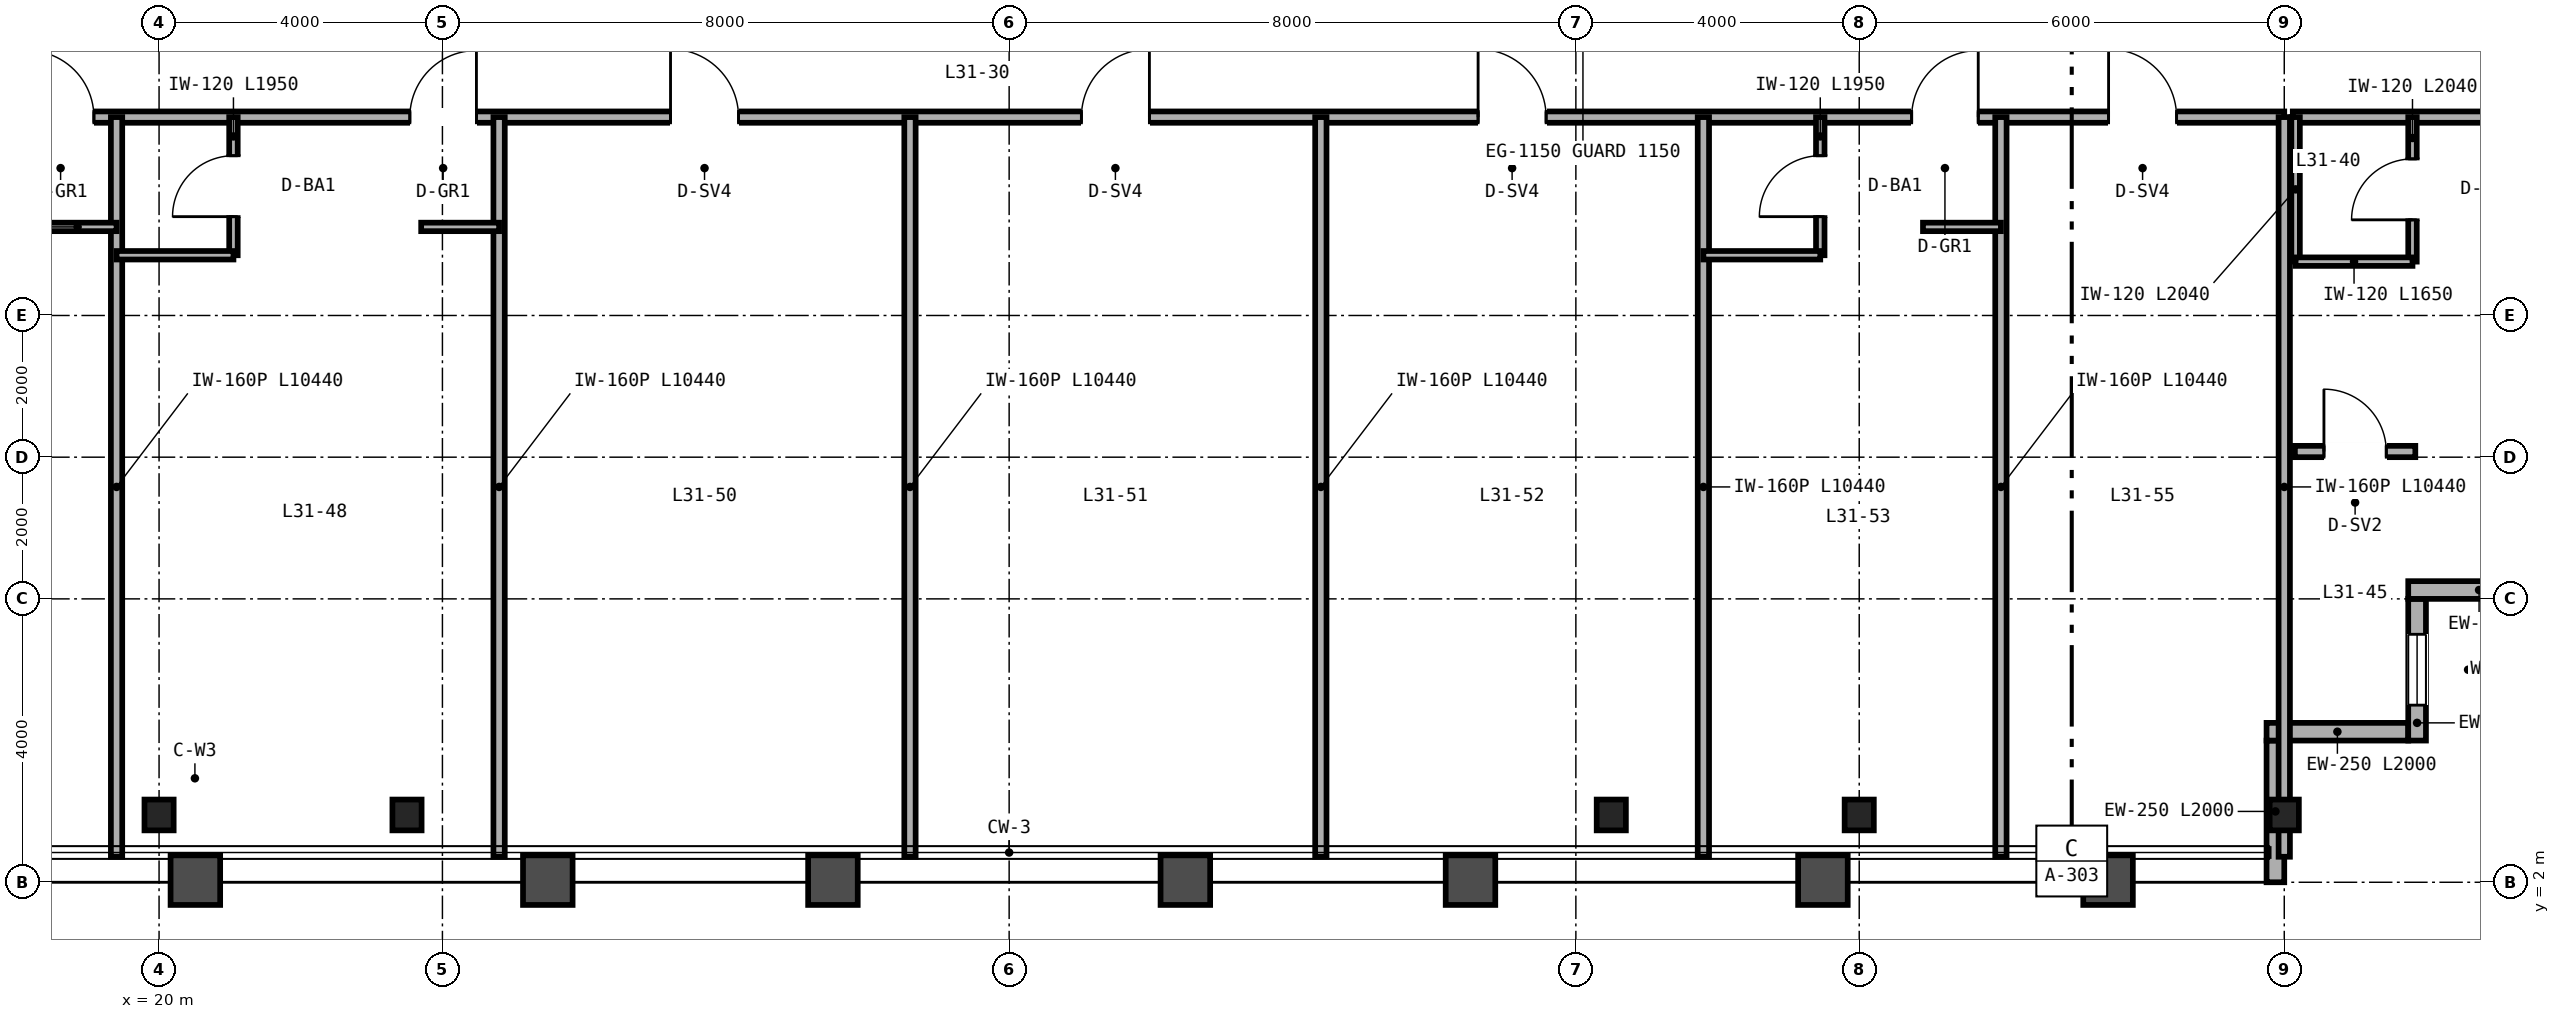
"""IFC4 building model, lengths in metres.
Left out: names, types, materials, properties, quantities, classifications, styles, units other than length and angle.
Written with IfcOpenShell. Run it as: python <this file> out.ifc"""

import sys

from ifc_helpers import new_model, si_unit, direction, frame, frame_2d, origin, origin_2d, place, context, subcontext, project, spatial, rectangle, i_section, extrude, source, transform, mapped, element, fill, save


model = new_model("IFC4")
c1 = context("Model", 3, precision=1e-05, world=origin(), true_north=direction((0.0, 1.0)))
c2 = subcontext(c1, "Body", "Model", "MODEL_VIEW")
j1 = project(units=[si_unit("LENGTHUNIT", "METRE"), si_unit("PLANEANGLEUNIT", "RADIAN")], contexts=[c1])
p1 = place(None, origin())
s1 = spatial("IfcSite", under=j1, at=p1, CompositionType="ELEMENT")
p2 = place(p1, origin())
s2 = spatial("IfcBuilding", under=s1, at=p2, CompositionType="ELEMENT")
p3 = place(p2, frame((0.0, 0.0, 126.0)))
s3 = spatial("IfcBuildingStorey", under=s2, at=p3, CompositionType="ELEMENT", Elevation=126.0)
m1 = source(origin(), c2, "Body", "SweptSolid", [
    extrude(i_section(OverallWidth=0.412, OverallDepth=0.435, WebThickness=0.036, FlangeThickness=0.057, FilletRadius=0.025, at=origin_2d()), origin(), (0.0, 0.0, 1.0), 3.36),
])
for number, where, z_axis, x_axis in (
    (1, (20.0, 2.95, 0.0), (0.0, 0.0, 1.0), (1.0, 0.0, 0.0)),
    (2, (23.5, 2.95, 0.0), (0.0, 0.0, 1.0), (1.0, 0.0, 0.0)),
    (3, (40.5, 2.95, 0.0), (0.0, 0.0, 1.0), (1.0, 0.0, 0.0)),
    (4, (44.0, 2.95, 0.0), (0.0, 0.0, 1.0), (1.0, 0.0, 0.0)),
    (5, (50.0, 2.95, 0.0), (0.0, 0.0, 1.0), (1.0, 0.0, 0.0)),
):
    element("IfcColumn", number, at=place(p3, frame(where, z_axis=z_axis, x_axis=x_axis)), inside=s3, PredefinedType="COLUMN", context=c2, shape_type="MappedRepresentation", body=[
        mapped(m1, transform((0.0, 0.0, 0.0), scale=1.0)),
    ])
p4 = place(p3, frame((49.875, 2.0, 0.0), z_axis=(0.0, 0.0, 1.0), x_axis=(0.0, 1.0, 0.0)))
e6 = element("IfcWall", 6, at=p4, inside=s3, PredefinedType="SOLIDWALL", context=c2, shape_type="SweptSolid", body=[
    extrude(rectangle(XDim=2.0, YDim=0.25, at=frame_2d((1.0, 0.0))), origin(), (0.0, 0.0, 1.0), 2.667),
])
p5 = place(p3, frame((49.75, 4.125, 0.0), z_axis=(0.0, 0.0, 1.0), x_axis=(1.0, 0.0, 0.0)))
e7 = element("IfcWall", 7, at=p5, inside=s3, PredefinedType="SOLIDWALL", context=c2, shape_type="SweptSolid", body=[
    extrude(rectangle(XDim=2.0, YDim=0.25, at=frame_2d((1.0, 0.0))), origin(), (0.0, 0.0, 1.0), 3.36),
])
p6 = place(p3, frame((51.875, 4.0, 0.0), z_axis=(0.0, 0.0, 1.0), x_axis=(0.0, 1.0, 0.0)))
e8 = element("IfcWall", 8, at=p6, inside=s3, PredefinedType="SOLIDWALL", context=c2, shape_type="SweptSolid", body=[
    extrude(rectangle(XDim=2.0, YDim=0.25, at=frame_2d((1.0, 0.0))), origin(), (0.0, 0.0, 1.0), 3.36),
])
p7 = place(p6, frame((0.5, 0.0, 0.85)))
e9 = element("IfcOpeningElement", 9, at=p7, cuts=e8, PredefinedType="OPENING", context=c2, shape_type="SweptSolid", body=[
    extrude(rectangle(XDim=1.0, YDim=1.9, at=frame_2d((0.5, 0.95))), frame((0.0, 0.135, 0.0), z_axis=(0.0, -1.0, 0.0), x_axis=(1.0, 0.0, 0.0)), (0.0, 0.0, 1.0), 0.27),
])
p8 = place(p3, frame((51.75, 6.125, 0.0), z_axis=(0.0, 0.0, 1.0), x_axis=(1.0, 0.0, 0.0)))
e10 = element("IfcWall", 10, at=p8, inside=s3, PredefinedType="SOLIDWALL", context=c2, shape_type="SweptSolid", body=[
    extrude(rectangle(XDim=2.0, YDim=0.25, at=frame_2d((1.0, 0.0))), origin(), (0.0, 0.0, 1.0), 3.36),
])
p9 = place(p3, frame((50.12, 12.8, 0.0), z_axis=(0.0, 0.0, 1.0), x_axis=(1.0, 0.0, 0.0)))
e11 = element("IfcWall", 11, at=p9, inside=s3, PredefinedType="PARTITIONING", context=c2, shape_type="SweptSolid", body=[
    extrude(rectangle(XDim=5.68, YDim=0.16, at=frame_2d((2.84, 0.0))), origin(), (0.0, 0.0, 1.0), 3.36),
])
p10 = place(p9, frame((3.15, 0.0, 0.0)))
e12 = element("IfcOpeningElement", 12, at=p10, cuts=e11, PredefinedType="OPENING", context=c2, shape_type="SweptSolid", body=[
    extrude(rectangle(XDim=0.94, YDim=2.15, at=frame_2d((0.47, 1.075))), frame((0.0, 0.09, 0.0), z_axis=(0.0, -1.0, 0.0), x_axis=(1.0, 0.0, 0.0)), (0.0, 0.0, 1.0), 0.18),
])
p11 = place(p3, frame((51.81, 10.76, 0.0), z_axis=(0.0, 0.0, 1.0), x_axis=(0.0, 1.0, 0.0)))
e13 = element("IfcWall", 13, at=p11, inside=s3, PredefinedType="PARTITIONING", context=c2, shape_type="SweptSolid", body=[
    extrude(rectangle(XDim=2.04, YDim=0.12, at=frame_2d((1.02, 0.0))), origin(), (0.0, 0.0, 1.0), 3.36),
])
p12 = place(p11, frame((0.59, 0.0, 0.0)))
e14 = element("IfcOpeningElement", 14, at=p12, cuts=e13, PredefinedType="OPENING", context=c2, shape_type="SweptSolid", body=[
    extrude(rectangle(XDim=0.86, YDim=2.1, at=frame_2d((0.43, 1.05))), frame((0.0, 0.07, 0.0), z_axis=(0.0, -1.0, 0.0), x_axis=(1.0, 0.0, 0.0)), (0.0, 0.0, 1.0), 0.14),
])
p13 = place(p3, frame((50.16, 10.76, 0.0), z_axis=(0.0, 0.0, 1.0), x_axis=(0.0, 1.0, 0.0)))
e15 = element("IfcWall", 15, at=p13, inside=s3, PredefinedType="PARTITIONING", context=c2, shape_type="SweptSolid", body=[
    extrude(rectangle(XDim=2.04, YDim=0.12, at=frame_2d((1.02, 0.0))), origin(), (0.0, 0.0, 1.0), 3.36),
])
p14 = place(p3, frame((50.16, 10.76, 0.0), z_axis=(0.0, 0.0, 1.0), x_axis=(1.0, 0.0, 0.0)))
e16 = element("IfcWall", 16, at=p14, inside=s3, PredefinedType="PARTITIONING", context=c2, shape_type="SweptSolid", body=[
    extrude(rectangle(XDim=1.65, YDim=0.12, at=frame_2d((0.825, 0.0))), origin(), (0.0, 0.0, 1.0), 3.36),
])
p15 = place(p3, frame((50.15, 8.08, 0.0), z_axis=(0.0, 0.0, 1.0), x_axis=(1.0, 0.0, 0.0)))
e17 = element("IfcWall", 17, at=p15, inside=s3, PredefinedType="PARTITIONING", context=c2, shape_type="SweptSolid", body=[
    extrude(rectangle(XDim=1.7, YDim=0.16, at=frame_2d((0.85, 0.0))), origin(), (0.0, 0.0, 1.0), 3.36),
])
p16 = place(p15, frame((0.41, 0.0, 0.0)))
e18 = element("IfcOpeningElement", 18, at=p16, cuts=e17, PredefinedType="OPENING", context=c2, shape_type="SweptSolid", body=[
    extrude(rectangle(XDim=0.88, YDim=2.15, at=frame_2d((0.44, 1.075))), frame((0.0, 0.09, 0.0), z_axis=(0.0, -1.0, 0.0), x_axis=(1.0, 0.0, 0.0)), (0.0, 0.0, 1.0), 0.18),
])
p17 = place(p3, frame((14.0, 12.8, 0.0), z_axis=(0.0, 0.0, 1.0), x_axis=(1.0, 0.0, 0.0)))
e19 = element("IfcWall", 19, at=p17, inside=s3, PredefinedType="PARTITIONING", context=c2, shape_type="SweptSolid", body=[
    extrude(rectangle(XDim=36.0, YDim=0.16, at=frame_2d((18.0, 0.0))), origin(), (0.0, 0.0, 1.0), 2.581),
])
p18 = place(p17, frame((4.14, 0.0, 0.0)))
e20 = element("IfcOpeningElement", 20, at=p18, cuts=e19, PredefinedType="OPENING", context=c2, shape_type="SweptSolid", body=[
    extrude(rectangle(XDim=0.94, YDim=2.15, at=frame_2d((0.47, 1.075))), frame((0.0, 0.09, 0.0), z_axis=(0.0, -1.0, 0.0), x_axis=(1.0, 0.0, 0.0)), (0.0, 0.0, 1.0), 0.18),
])
p19 = place(p17, frame((9.54, 0.0, 0.0)))
e21 = element("IfcOpeningElement", 21, at=p19, cuts=e19, PredefinedType="OPENING", context=c2, shape_type="SweptSolid", body=[
    extrude(rectangle(XDim=0.94, YDim=2.15, at=frame_2d((0.47, 1.075))), frame((0.0, 0.09, 0.0), z_axis=(0.0, -1.0, 0.0), x_axis=(1.0, 0.0, 0.0)), (0.0, 0.0, 1.0), 0.18),
])
p20 = place(p17, frame((13.22, 0.0, 0.0)))
e22 = element("IfcOpeningElement", 22, at=p20, cuts=e19, PredefinedType="OPENING", context=c2, shape_type="SweptSolid", body=[
    extrude(rectangle(XDim=0.96, YDim=2.15, at=frame_2d((0.48, 1.075))), frame((0.0, 0.09, 0.0), z_axis=(0.0, -1.0, 0.0), x_axis=(1.0, 0.0, 0.0)), (0.0, 0.0, 1.0), 0.18),
])
p21 = place(p17, frame((19.02, 0.0, 0.0)))
e23 = element("IfcOpeningElement", 23, at=p21, cuts=e19, PredefinedType="OPENING", context=c2, shape_type="SweptSolid", body=[
    extrude(rectangle(XDim=0.96, YDim=2.15, at=frame_2d((0.48, 1.075))), frame((0.0, 0.09, 0.0), z_axis=(0.0, -1.0, 0.0), x_axis=(1.0, 0.0, 0.0)), (0.0, 0.0, 1.0), 0.18),
])
p22 = place(p17, frame((24.62, 0.0, 0.0)))
e24 = element("IfcOpeningElement", 24, at=p22, cuts=e19, PredefinedType="OPENING", context=c2, shape_type="SweptSolid", body=[
    extrude(rectangle(XDim=0.96, YDim=2.15, at=frame_2d((0.48, 1.075))), frame((0.0, 0.09, 0.0), z_axis=(0.0, -1.0, 0.0), x_axis=(1.0, 0.0, 0.0)), (0.0, 0.0, 1.0), 0.18),
])
p23 = place(p17, frame((30.74, 0.0, 0.0)))
e25 = element("IfcOpeningElement", 25, at=p23, cuts=e19, PredefinedType="OPENING", context=c2, shape_type="SweptSolid", body=[
    extrude(rectangle(XDim=0.94, YDim=2.15, at=frame_2d((0.47, 1.075))), frame((0.0, 0.09, 0.0), z_axis=(0.0, -1.0, 0.0), x_axis=(1.0, 0.0, 0.0)), (0.0, 0.0, 1.0), 0.18),
])
p24 = place(p17, frame((33.52, 0.0, 0.0)))
e26 = element("IfcOpeningElement", 26, at=p24, cuts=e19, PredefinedType="OPENING", context=c2, shape_type="SweptSolid", body=[
    extrude(rectangle(XDim=0.96, YDim=2.15, at=frame_2d((0.48, 1.075))), frame((0.0, 0.09, 0.0), z_axis=(0.0, -1.0, 0.0), x_axis=(1.0, 0.0, 0.0)), (0.0, 0.0, 1.0), 0.18),
])
for number, where, z_axis, x_axis in (
    (27, (50.0, 2.36, 0.0), (0.0, 0.0, 1.0), (0.0, 1.0, 0.0)),
    (28, (19.4, 2.36, 0.0), (0.0, 0.0, 1.0), (0.0, 1.0, 0.0)),
):
    element("IfcWall", number, at=place(p3, frame(where, z_axis=z_axis, x_axis=x_axis)), inside=s3, PredefinedType="PARTITIONING", context=c2, shape_type="SweptSolid", body=[
        extrude(rectangle(XDim=10.44, YDim=0.16, at=frame_2d((5.22, 0.0))), origin(), (0.0, 0.0, 1.0), 2.667),
    ])
p25 = place(p3, frame((18.3, 11.25, 0.0), z_axis=(0.0, 0.0, 1.0), x_axis=(1.0, 0.0, 0.0)))
e29 = element("IfcWall", 29, at=p25, inside=s3, PredefinedType="PARTITIONING", context=c2, shape_type="SweptSolid", body=[
    extrude(rectangle(XDim=1.1, YDim=0.12, at=frame_2d((0.55, 0.0))), origin(), (0.0, 0.0, 1.0), 3.36),
])
p26 = place(p3, frame((24.8, 2.36, 0.0), z_axis=(0.0, 0.0, 1.0), x_axis=(0.0, 1.0, 0.0)))
e30 = element("IfcWall", 30, at=p26, inside=s3, PredefinedType="PARTITIONING", context=c2, shape_type="SweptSolid", body=[
    extrude(rectangle(XDim=10.44, YDim=0.16, at=frame_2d((5.22, 0.0))), origin(), (0.0, 0.0, 1.0), 2.433),
])
p27 = place(p3, frame((21.05, 10.85, 0.0), z_axis=(0.0, 0.0, 1.0), x_axis=(0.0, 1.0, 0.0)))
e31 = element("IfcWall", 31, at=p27, inside=s3, PredefinedType="PARTITIONING", context=c2, shape_type="SweptSolid", body=[
    extrude(rectangle(XDim=1.95, YDim=0.12, at=frame_2d((0.975, 0.0))), origin(), (0.0, 0.0, 1.0), 3.36),
])
p28 = place(p27, frame((0.545, 0.0, 0.0)))
e32 = element("IfcOpeningElement", 32, at=p28, cuts=e31, PredefinedType="OPENING", context=c2, shape_type="SweptSolid", body=[
    extrude(rectangle(XDim=0.86, YDim=2.1, at=frame_2d((0.43, 1.05))), frame((0.0, 0.07, 0.0), z_axis=(0.0, -1.0, 0.0), x_axis=(1.0, 0.0, 0.0)), (0.0, 0.0, 1.0), 0.14),
])
p29 = place(p3, frame((19.4, 10.85, 0.0), z_axis=(0.0, 0.0, 1.0), x_axis=(1.0, 0.0, 0.0)))
e33 = element("IfcWall", 33, at=p29, inside=s3, PredefinedType="PARTITIONING", context=c2, shape_type="SweptSolid", body=[
    extrude(rectangle(XDim=1.65, YDim=0.12, at=frame_2d((0.825, 0.0))), origin(), (0.0, 0.0, 1.0), 3.36),
])
p30 = place(p3, frame((23.7, 11.25, 0.0), z_axis=(0.0, 0.0, 1.0), x_axis=(1.0, 0.0, 0.0)))
e34 = element("IfcWall", 34, at=p30, inside=s3, PredefinedType="PARTITIONING", context=c2, shape_type="SweptSolid", body=[
    extrude(rectangle(XDim=1.1, YDim=0.12, at=frame_2d((0.55, 0.0))), origin(), (0.0, 0.0, 1.0), 2.581),
])
for number, where, z_axis, x_axis in (
    (35, (30.6, 2.36, 0.0), (0.0, 0.0, 1.0), (0.0, 1.0, 0.0)),
    (36, (36.4, 2.36, 0.0), (0.0, 0.0, 1.0), (0.0, 1.0, 0.0)),
):
    element("IfcWall", number, at=place(p3, frame(where, z_axis=z_axis, x_axis=x_axis)), inside=s3, PredefinedType="PARTITIONING", context=c2, shape_type="SweptSolid", body=[
        extrude(rectangle(XDim=10.44, YDim=0.16, at=frame_2d((5.22, 0.0))), origin(), (0.0, 0.0, 1.0), 2.433),
    ])
p31 = place(p3, frame((41.8, 2.36, 0.0), z_axis=(0.0, 0.0, 1.0), x_axis=(0.0, 1.0, 0.0)))
e37 = element("IfcWall", 37, at=p31, inside=s3, PredefinedType="PARTITIONING", context=c2, shape_type="SweptSolid", body=[
    extrude(rectangle(XDim=10.44, YDim=0.16, at=frame_2d((5.22, 0.0))), origin(), (0.0, 0.0, 1.0), 2.823),
])
p32 = place(p3, frame((46.0, 2.36, 0.0), z_axis=(0.0, 0.0, 1.0), x_axis=(0.0, 1.0, 0.0)))
e38 = element("IfcWall", 38, at=p32, inside=s3, PredefinedType="PARTITIONING", context=c2, shape_type="SweptSolid", body=[
    extrude(rectangle(XDim=10.44, YDim=0.16, at=frame_2d((5.22, 0.0))), origin(), (0.0, 0.0, 1.0), 2.667),
])
p33 = place(p3, frame((43.45, 10.85, 0.0), z_axis=(0.0, 0.0, 1.0), x_axis=(0.0, 1.0, 0.0)))
e39 = element("IfcWall", 39, at=p33, inside=s3, PredefinedType="PARTITIONING", context=c2, shape_type="SweptSolid", body=[
    extrude(rectangle(XDim=1.95, YDim=0.12, at=frame_2d((0.975, 0.0))), origin(), (0.0, 0.0, 1.0), 3.36),
])
p34 = place(p33, frame((0.545, 0.0, 0.0)))
e40 = element("IfcOpeningElement", 40, at=p34, cuts=e39, PredefinedType="OPENING", context=c2, shape_type="SweptSolid", body=[
    extrude(rectangle(XDim=0.86, YDim=2.1, at=frame_2d((0.43, 1.05))), frame((0.0, 0.07, 0.0), z_axis=(0.0, -1.0, 0.0), x_axis=(1.0, 0.0, 0.0)), (0.0, 0.0, 1.0), 0.14),
])
p35 = place(p3, frame((41.8, 10.85, 0.0), z_axis=(0.0, 0.0, 1.0), x_axis=(1.0, 0.0, 0.0)))
e41 = element("IfcWall", 41, at=p35, inside=s3, PredefinedType="PARTITIONING", context=c2, shape_type="SweptSolid", body=[
    extrude(rectangle(XDim=1.65, YDim=0.12, at=frame_2d((0.825, 0.0))), origin(), (0.0, 0.0, 1.0), 3.36),
])
p36 = place(p3, frame((44.9, 11.25, 0.0), z_axis=(0.0, 0.0, 1.0), x_axis=(1.0, 0.0, 0.0)))
e42 = element("IfcWall", 42, at=p36, inside=s3, PredefinedType="PARTITIONING", context=c2, shape_type="SweptSolid", body=[
    extrude(rectangle(XDim=1.1, YDim=0.12, at=frame_2d((0.55, 0.0))), origin(), (0.0, 0.0, 1.0), 3.36),
])
m2 = source(origin(), c2, "Body", "SweptSolid", [
    extrude(rectangle(XDim=1.0, YDim=1.9, at=frame_2d((0.5, 0.95))), frame((0.0, 0.03, 0.0), z_axis=(0.0, -1.0, 0.0), x_axis=(1.0, 0.0, 0.0)), (0.0, 0.0, 1.0), 0.06),
])
p37 = place(p7, origin())
e43 = element("IfcWindow", 43, at=p37, inside=s3, PartitioningType="SINGLE_PANEL", PredefinedType="WINDOW", context=c2, shape_type="MappedRepresentation", body=[
    mapped(m2, transform((0.0, 0.0, 0.0), scale=1.0)),
])
fill(e9, e43)
m3 = source(origin(), c2, "Body", "SweptSolid", [
    extrude(rectangle(XDim=0.86, YDim=2.1, at=frame_2d((0.43, 1.05))), frame((0.0, 0.025, 0.0), z_axis=(0.0, -1.0, 0.0), x_axis=(1.0, 0.0, 0.0)), (0.0, 0.0, 1.0), 0.05),
])
p38 = place(p12, origin())
e44 = element("IfcDoor", 44, at=p38, inside=s3, OperationType="SINGLE_SWING_LEFT", PredefinedType="DOOR", context=c2, shape_type="MappedRepresentation", body=[
    mapped(m3, transform((0.0, 0.0, 0.0), scale=1.0)),
])
fill(e14, e44)
m4 = source(origin(), c2, "Body", "SweptSolid", [
    extrude(rectangle(XDim=0.88, YDim=2.15, at=frame_2d((0.44, 1.075))), frame((0.0, 0.025, 0.0), z_axis=(0.0, -1.0, 0.0), x_axis=(1.0, 0.0, 0.0)), (0.0, 0.0, 1.0), 0.05),
])
p39 = place(p16, origin())
e45 = element("IfcDoor", 45, at=p39, inside=s3, OperationType="SINGLE_SWING_LEFT", PredefinedType="DOOR", context=c2, shape_type="MappedRepresentation", body=[
    mapped(m4, transform((0.0, 0.0, 0.0), scale=1.0)),
])
fill(e18, e45)
p40 = place(p28, origin())
e46 = element("IfcDoor", 46, at=p40, inside=s3, OperationType="SINGLE_SWING_LEFT", PredefinedType="DOOR", context=c2, shape_type="MappedRepresentation", body=[
    mapped(m3, transform((0.0, 0.0, 0.0), scale=1.0)),
])
fill(e32, e46)
p41 = place(p34, origin())
e47 = element("IfcDoor", 47, at=p41, inside=s3, OperationType="SINGLE_SWING_LEFT", PredefinedType="DOOR", context=c2, shape_type="MappedRepresentation", body=[
    mapped(m3, transform((0.0, 0.0, 0.0), scale=1.0)),
])
fill(e40, e47)
m5 = source(origin(), c2, "Body", "SweptSolid", [
    extrude(rectangle(XDim=0.94, YDim=2.15, at=frame_2d((0.47, 1.075))), frame((0.0, 0.025, 0.0), z_axis=(0.0, -1.0, 0.0), x_axis=(1.0, 0.0, 0.0)), (0.0, 0.0, 1.0), 0.05),
])
p42 = place(p18, origin())
e48 = element("IfcDoor", 48, at=p42, inside=s3, OperationType="SINGLE_SWING_LEFT", PredefinedType="DOOR", context=c2, shape_type="MappedRepresentation", body=[
    mapped(m5, transform((0.0, 0.0, 0.0), scale=1.0)),
])
fill(e20, e48)
p43 = place(p19, origin())
e49 = element("IfcDoor", 49, at=p43, inside=s3, OperationType="SINGLE_SWING_RIGHT", PredefinedType="DOOR", context=c2, shape_type="MappedRepresentation", body=[
    mapped(m5, transform((0.0, 0.0, 0.0), scale=1.0)),
])
fill(e21, e49)
m6 = source(origin(), c2, "Body", "SweptSolid", [
    extrude(rectangle(XDim=0.96, YDim=2.15, at=frame_2d((0.48, 1.075))), frame((0.0, 0.025, 0.0), z_axis=(0.0, -1.0, 0.0), x_axis=(1.0, 0.0, 0.0)), (0.0, 0.0, 1.0), 0.05),
])
p44 = place(p20, origin())
e50 = element("IfcDoor", 50, at=p44, inside=s3, OperationType="SINGLE_SWING_LEFT", PredefinedType="DOOR", context=c2, shape_type="MappedRepresentation", body=[
    mapped(m6, transform((0.0, 0.0, 0.0), scale=1.0)),
])
fill(e22, e50)
p45 = place(p21, origin())
e51 = element("IfcDoor", 51, at=p45, inside=s3, OperationType="SINGLE_SWING_RIGHT", PredefinedType="DOOR", context=c2, shape_type="MappedRepresentation", body=[
    mapped(m6, transform((0.0, 0.0, 0.0), scale=1.0)),
])
fill(e23, e51)
p46 = place(p22, origin())
e52 = element("IfcDoor", 52, at=p46, inside=s3, OperationType="SINGLE_SWING_LEFT", PredefinedType="DOOR", context=c2, shape_type="MappedRepresentation", body=[
    mapped(m6, transform((0.0, 0.0, 0.0), scale=1.0)),
])
fill(e24, e52)
p47 = place(p23, origin())
e53 = element("IfcDoor", 53, at=p47, inside=s3, OperationType="SINGLE_SWING_RIGHT", PredefinedType="DOOR", context=c2, shape_type="MappedRepresentation", body=[
    mapped(m5, transform((0.0, 0.0, 0.0), scale=1.0)),
])
fill(e25, e53)
p48 = place(p24, origin())
e54 = element("IfcDoor", 54, at=p48, inside=s3, OperationType="SINGLE_SWING_LEFT", PredefinedType="DOOR", context=c2, shape_type="MappedRepresentation", body=[
    mapped(m6, transform((0.0, 0.0, 0.0), scale=1.0)),
])
fill(e26, e54)
save(model, sys.argv[1])
